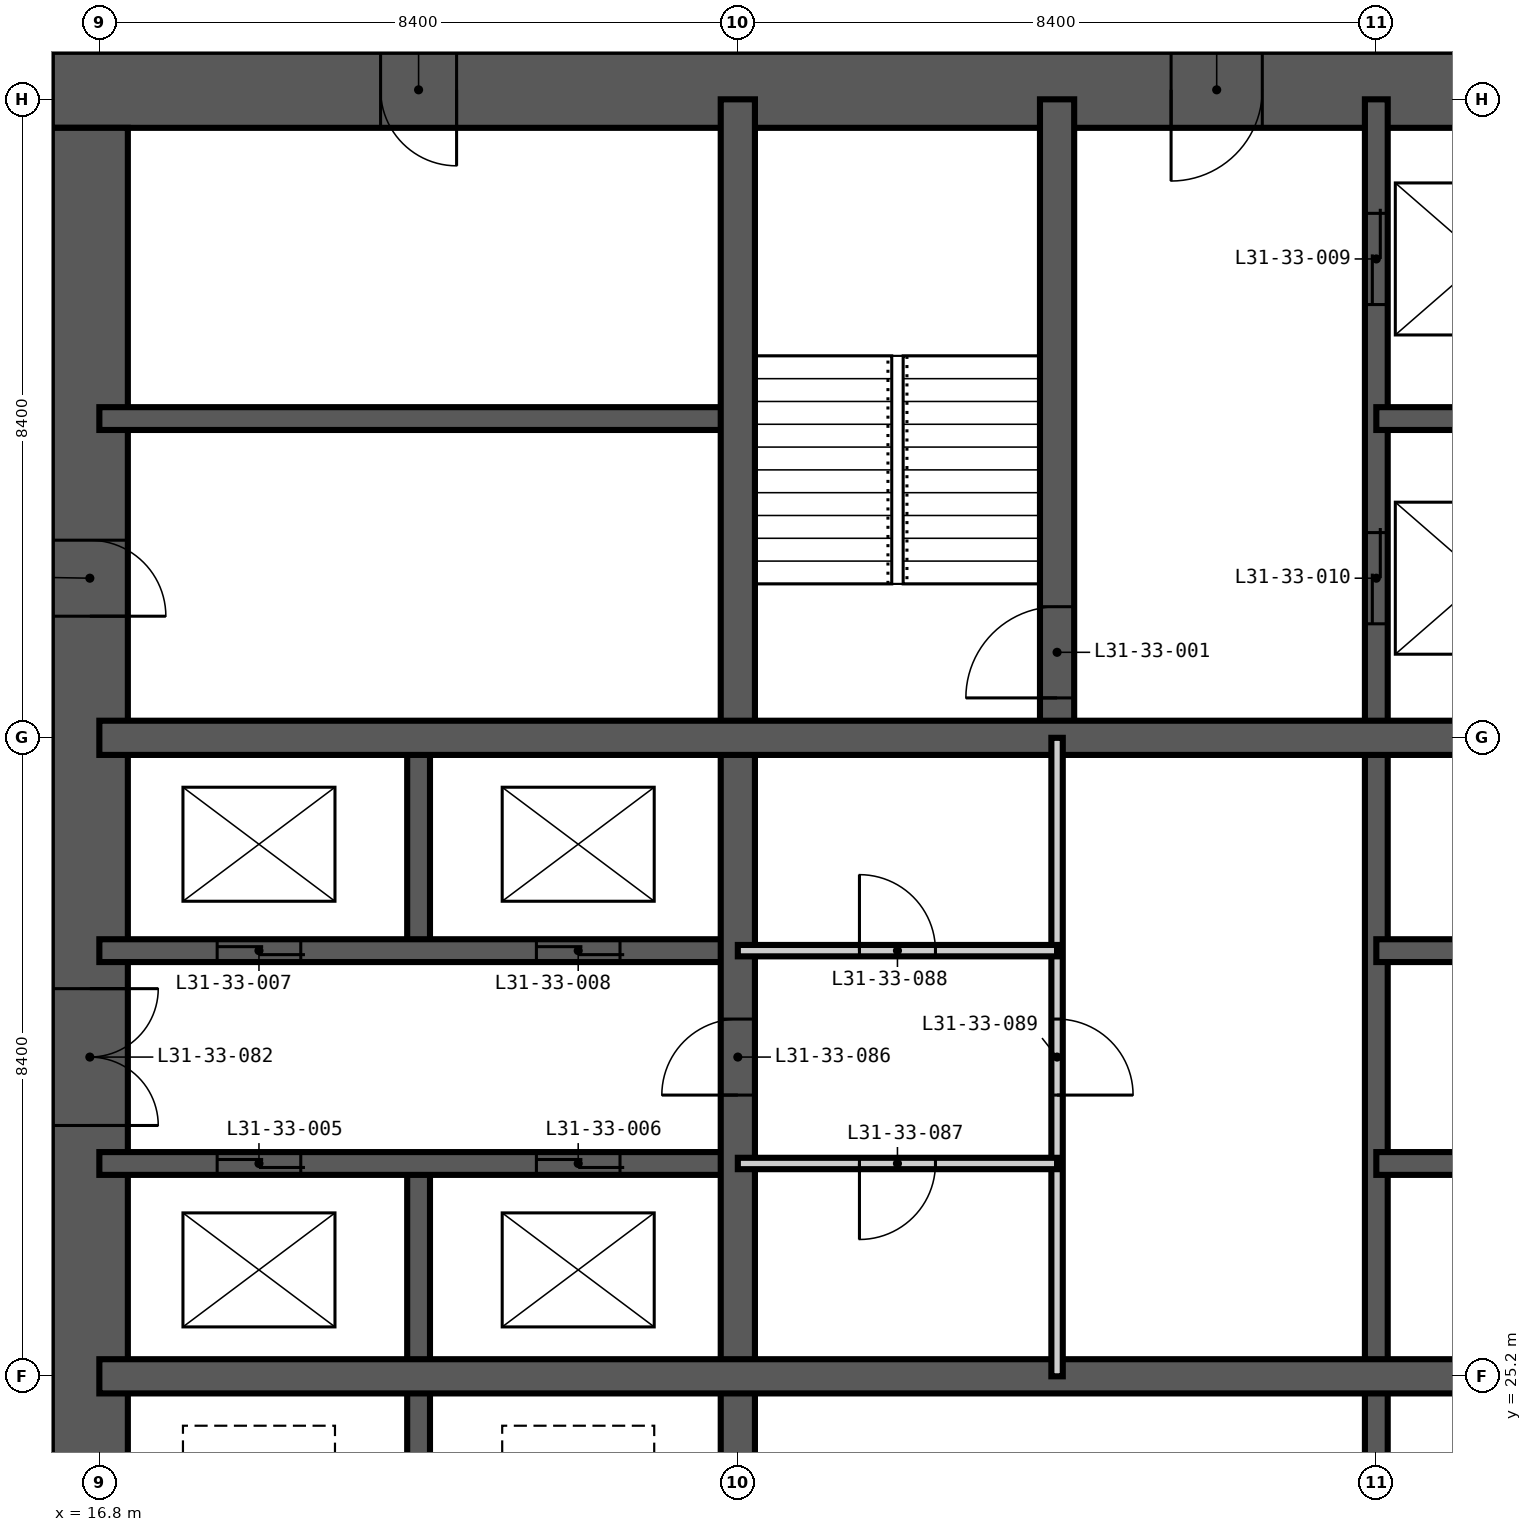
"""IFC4 building model, lengths in metres.
Left out: names, types, materials, properties, quantities, classifications, styles, units other than length and angle.
Written with IfcOpenShell. Run it as: python <this file> out.ifc"""

import sys

from ifc_helpers import new_model, si_unit, direction, frame, frame_2d, origin, place, context, subcontext, project, spatial, rectangle, extrude, element, fill, save


model = new_model("IFC4")
c1 = context("Model", 3, precision=1e-05, world=origin(), true_north=direction((0.0, 1.0)))
c2 = subcontext(c1, "Body", "Model", "MODEL_VIEW")
j1 = project(units=[si_unit("LENGTHUNIT", "METRE"), si_unit("PLANEANGLEUNIT", "RADIAN")], contexts=[c1])
p1 = place(None, origin())
s1 = spatial("IfcSite", under=j1, at=p1, CompositionType="ELEMENT")
p2 = place(p1, origin())
s2 = spatial("IfcBuilding", under=s1, at=p2, CompositionType="ELEMENT")
p3 = place(p2, frame((0.0, 0.0, 122.4)))
s3 = spatial("IfcBuildingStorey", under=s2, at=p3, CompositionType="ELEMENT", Elevation=122.4)
p4 = place(p3, frame((42.625, 42.125, -0.35), z_axis=(0.0, 0.0, 1.0), x_axis=(-1.0, 0.0, 0.0)))
e1 = element("IfcWall", 1, at=p4, inside=s3, PredefinedType="SHEAR", context=c2, shape_type="SweptSolid", body=[
    extrude(rectangle(XDim=26.45, YDim=1.0, at=frame_2d((13.225, 0.0))), origin(), (0.0, 0.0, 1.0), 3.6),
])
p5 = place(p4, frame((21.125, 0.0, 0.35)))
e2 = element("IfcOpeningElement", 2, at=p5, cuts=e1, PredefinedType="OPENING", context=c2, shape_type="SweptSolid", body=[
    extrude(rectangle(XDim=1.0, YDim=2.1, at=frame_2d((0.5, 1.05))), frame((0.0, 0.51, 0.0), z_axis=(0.0, -1.0, 0.0), x_axis=(1.0, 0.0, 0.0)), (0.0, 0.0, 1.0), 1.02),
])
p6 = place(p4, frame((10.525, 0.0, 0.35)))
e3 = element("IfcOpeningElement", 3, at=p6, cuts=e1, PredefinedType="OPENING", context=c2, shape_type="SweptSolid", body=[
    extrude(rectangle(XDim=1.2, YDim=2.2, at=frame_2d((0.6, 1.1))), frame((0.0, 0.51, 0.0), z_axis=(0.0, -1.0, 0.0), x_axis=(1.0, 0.0, 0.0)), (0.0, 0.0, 1.0), 1.02),
])
p7 = place(p3, frame((16.675, 41.625, -0.35), z_axis=(0.0, 0.0, 1.0), x_axis=(0.0, -1.0, 0.0)))
e4 = element("IfcWall", 4, at=p7, inside=s3, PredefinedType="SHEAR", context=c2, shape_type="SweptSolid", body=[
    extrude(rectangle(XDim=24.45, YDim=1.0, at=frame_2d((12.225, 0.0))), origin(), (0.0, 0.0, 1.0), 3.6),
])
p8 = place(p7, frame((11.325, 0.0, 0.35)))
e5 = element("IfcOpeningElement", 5, at=p8, cuts=e4, PredefinedType="OPENING", context=c2, shape_type="SweptSolid", body=[
    extrude(rectangle(XDim=1.8, YDim=2.2, at=frame_2d((0.9, 1.1))), frame((0.0, 0.51, 0.0), z_axis=(0.0, -1.0, 0.0), x_axis=(1.0, 0.0, 0.0)), (0.0, 0.0, 1.0), 1.02),
])
p9 = place(p7, frame((20.125, 0.0, 0.35)))
e6 = element("IfcOpeningElement", 6, at=p9, cuts=e4, PredefinedType="OPENING", context=c2, shape_type="SweptSolid", body=[
    extrude(rectangle(XDim=1.0, YDim=2.1, at=frame_2d((0.5, 1.05))), frame((0.0, 0.51, 0.0), z_axis=(0.0, -1.0, 0.0), x_axis=(1.0, 0.0, 0.0)), (0.0, 0.0, 1.0), 1.02),
])
p10 = place(p7, frame((5.425, 0.0, 0.35)))
e7 = element("IfcOpeningElement", 7, at=p10, cuts=e4, PredefinedType="OPENING", context=c2, shape_type="SweptSolid", body=[
    extrude(rectangle(XDim=1.0, YDim=2.1, at=frame_2d((0.5, 1.05))), frame((0.0, 0.51, 0.0), z_axis=(0.0, -1.0, 0.0), x_axis=(1.0, 0.0, 0.0)), (0.0, 0.0, 1.0), 1.02),
])
p11 = place(p3, frame((21.0, 22.4, -0.35), z_axis=(0.0, 0.0, 1.0), x_axis=(0.0, 1.0, 0.0)))
e8 = element("IfcWall", 8, at=p11, inside=s3, PredefinedType="SHEAR", context=c2, shape_type="SweptSolid", body=[
    extrude(rectangle(XDim=5.6, YDim=0.3, at=frame_2d((2.8, 0.0))), origin(), (0.0, 0.0, 1.0), 3.6),
])
p12 = place(p3, frame((21.0, 30.8, -0.35), z_axis=(0.0, 0.0, 1.0), x_axis=(0.0, 1.0, 0.0)))
e9 = element("IfcWall", 9, at=p12, inside=s3, PredefinedType="SHEAR", context=c2, shape_type="SweptSolid", body=[
    extrude(rectangle(XDim=2.8, YDim=0.3, at=frame_2d((1.4, 0.0))), origin(), (0.0, 0.0, 1.0), 3.6),
])
p13 = place(p3, frame((33.6, 16.8, -0.35), z_axis=(0.0, 0.0, 1.0), x_axis=(0.0, 1.0, 0.0)))
e10 = element("IfcWall", 10, at=p13, inside=s3, PredefinedType="SHEAR", context=c2, shape_type="SweptSolid", body=[
    extrude(rectangle(XDim=25.2, YDim=0.3, at=frame_2d((12.6, 0.0))), origin(), (0.0, 0.0, 1.0), 3.6),
])
p14 = place(p13, frame((22.5, 0.0, 0.35)))
e11 = element("IfcOpeningElement", 11, at=p14, cuts=e10, PredefinedType="OPENING", context=c2, shape_type="SweptSolid", body=[
    extrude(rectangle(XDim=1.2, YDim=2.2, at=frame_2d((0.6, 1.1))), frame((0.0, 0.16, 0.0), z_axis=(0.0, -1.0, 0.0), x_axis=(1.0, 0.0, 0.0)), (0.0, 0.0, 1.0), 0.32),
])
p15 = place(p13, frame((18.3, 0.0, 0.35)))
e12 = element("IfcOpeningElement", 12, at=p15, cuts=e10, PredefinedType="OPENING", context=c2, shape_type="SweptSolid", body=[
    extrude(rectangle(XDim=1.2, YDim=2.2, at=frame_2d((0.6, 1.1))), frame((0.0, 0.16, 0.0), z_axis=(0.0, -1.0, 0.0), x_axis=(1.0, 0.0, 0.0)), (0.0, 0.0, 1.0), 0.32),
])
p16 = place(p3, frame((16.8, 28.0, -0.35), z_axis=(0.0, 0.0, 1.0), x_axis=(1.0, 0.0, 0.0)))
e13 = element("IfcWall", 13, at=p16, inside=s3, PredefinedType="SHEAR", context=c2, shape_type="SweptSolid", body=[
    extrude(rectangle(XDim=8.4, YDim=0.3, at=frame_2d((4.2, 0.0))), origin(), (0.0, 0.0, 1.0), 3.6),
])
p17 = place(p16, frame((1.55, 0.0, 0.35)))
e14 = element("IfcOpeningElement", 14, at=p17, cuts=e13, PredefinedType="OPENING", context=c2, shape_type="SweptSolid", body=[
    extrude(rectangle(XDim=1.1, YDim=2.2, at=frame_2d((0.55, 1.1))), frame((0.0, 0.16, 0.0), z_axis=(0.0, -1.0, 0.0), x_axis=(1.0, 0.0, 0.0)), (0.0, 0.0, 1.0), 0.32),
])
p18 = place(p16, frame((5.75, 0.0, 0.35)))
e15 = element("IfcOpeningElement", 15, at=p18, cuts=e13, PredefinedType="OPENING", context=c2, shape_type="SweptSolid", body=[
    extrude(rectangle(XDim=1.1, YDim=2.2, at=frame_2d((0.55, 1.1))), frame((0.0, 0.16, 0.0), z_axis=(0.0, -1.0, 0.0), x_axis=(1.0, 0.0, 0.0)), (0.0, 0.0, 1.0), 0.32),
])
p19 = place(p3, frame((33.6, 28.0, -0.35), z_axis=(0.0, 0.0, 1.0), x_axis=(1.0, 0.0, 0.0)))
e16 = element("IfcWall", 16, at=p19, inside=s3, PredefinedType="SHEAR", context=c2, shape_type="SweptSolid", body=[
    extrude(rectangle(XDim=8.4, YDim=0.3, at=frame_2d((4.2, 0.0))), origin(), (0.0, 0.0, 1.0), 3.6),
])
p20 = place(p19, frame((1.55, 0.0, 0.35)))
e17 = element("IfcOpeningElement", 17, at=p20, cuts=e16, PredefinedType="OPENING", context=c2, shape_type="SweptSolid", body=[
    extrude(rectangle(XDim=1.1, YDim=2.2, at=frame_2d((0.55, 1.1))), frame((0.0, 0.16, 0.0), z_axis=(0.0, -1.0, 0.0), x_axis=(1.0, 0.0, 0.0)), (0.0, 0.0, 1.0), 0.32),
])
p21 = place(p19, frame((5.75, 0.0, 0.35)))
e18 = element("IfcOpeningElement", 18, at=p21, cuts=e16, PredefinedType="OPENING", context=c2, shape_type="SweptSolid", body=[
    extrude(rectangle(XDim=1.1, YDim=2.2, at=frame_2d((0.55, 1.1))), frame((0.0, 0.16, 0.0), z_axis=(0.0, -1.0, 0.0), x_axis=(1.0, 0.0, 0.0)), (0.0, 0.0, 1.0), 0.32),
])
p22 = place(p3, frame((16.8, 30.8, -0.35), z_axis=(0.0, 0.0, 1.0), x_axis=(1.0, 0.0, 0.0)))
e19 = element("IfcWall", 19, at=p22, inside=s3, PredefinedType="SHEAR", context=c2, shape_type="SweptSolid", body=[
    extrude(rectangle(XDim=8.4, YDim=0.3, at=frame_2d((4.2, 0.0))), origin(), (0.0, 0.0, 1.0), 3.6),
])
p23 = place(p22, frame((1.55, 0.0, 0.35)))
e20 = element("IfcOpeningElement", 20, at=p23, cuts=e19, PredefinedType="OPENING", context=c2, shape_type="SweptSolid", body=[
    extrude(rectangle(XDim=1.1, YDim=2.2, at=frame_2d((0.55, 1.1))), frame((0.0, 0.16, 0.0), z_axis=(0.0, -1.0, 0.0), x_axis=(1.0, 0.0, 0.0)), (0.0, 0.0, 1.0), 0.32),
])
p24 = place(p22, frame((5.75, 0.0, 0.35)))
e21 = element("IfcOpeningElement", 21, at=p24, cuts=e19, PredefinedType="OPENING", context=c2, shape_type="SweptSolid", body=[
    extrude(rectangle(XDim=1.1, YDim=2.2, at=frame_2d((0.55, 1.1))), frame((0.0, 0.16, 0.0), z_axis=(0.0, -1.0, 0.0), x_axis=(1.0, 0.0, 0.0)), (0.0, 0.0, 1.0), 0.32),
])
for number, where, z_axis, x_axis in (
    (22, (33.6, 30.8, -0.35), (0.0, 0.0, 1.0), (1.0, 0.0, 0.0)),
    (23, (16.8, 37.8, -0.35), (0.0, 0.0, 1.0), (1.0, 0.0, 0.0)),
):
    element("IfcWall", number, at=place(p3, frame(where, z_axis=z_axis, x_axis=x_axis)), inside=s3, PredefinedType="SHEAR", context=c2, shape_type="SweptSolid", body=[
        extrude(rectangle(XDim=8.4, YDim=0.3, at=frame_2d((4.2, 0.0))), origin(), (0.0, 0.0, 1.0), 3.6),
    ])
p25 = place(p3, frame((33.6, 37.8, -0.35), z_axis=(0.0, 0.0, 1.0), x_axis=(1.0, 0.0, 0.0)))
e24 = element("IfcWall", 24, at=p25, inside=s3, PredefinedType="SHEAR", context=c2, shape_type="SweptSolid", body=[
    extrude(rectangle(XDim=2.8, YDim=0.3, at=frame_2d((1.4, 0.0))), origin(), (0.0, 0.0, 1.0), 3.6),
])
p26 = place(p3, frame((25.2, 16.8, -0.35), z_axis=(0.0, 0.0, 1.0), x_axis=(0.0, 1.0, 0.0)))
e25 = element("IfcWall", 25, at=p26, inside=s3, PredefinedType="SHEAR", context=c2, shape_type="SweptSolid", body=[
    extrude(rectangle(XDim=25.2, YDim=0.45, at=frame_2d((12.6, 0.0))), origin(), (0.0, 0.0, 1.0), 3.6),
])
p27 = place(p26, frame((12.1, 0.0, 0.35)))
e26 = element("IfcOpeningElement", 26, at=p27, cuts=e25, PredefinedType="OPENING", context=c2, shape_type="SweptSolid", body=[
    extrude(rectangle(XDim=1.0, YDim=2.1, at=frame_2d((0.5, 1.05))), frame((0.0, 0.235, 0.0), z_axis=(0.0, -1.0, 0.0), x_axis=(1.0, 0.0, 0.0)), (0.0, 0.0, 1.0), 0.47),
])
p28 = place(p3, frame((29.4, 33.6, -0.35), z_axis=(0.0, 0.0, 1.0), x_axis=(0.0, 1.0, 0.0)))
e27 = element("IfcWall", 27, at=p28, inside=s3, PredefinedType="SHEAR", context=c2, shape_type="SweptSolid", body=[
    extrude(rectangle(XDim=8.4, YDim=0.45, at=frame_2d((4.2, 0.0))), origin(), (0.0, 0.0, 1.0), 3.6),
])
p29 = place(p28, frame((0.525, 0.0, 0.35)))
e28 = element("IfcOpeningElement", 28, at=p29, cuts=e27, PredefinedType="OPENING", context=c2, shape_type="SweptSolid", body=[
    extrude(rectangle(XDim=1.2, YDim=2.2, at=frame_2d((0.6, 1.1))), frame((0.0, 0.235, 0.0), z_axis=(0.0, -1.0, 0.0), x_axis=(1.0, 0.0, 0.0)), (0.0, 0.0, 1.0), 0.47),
])
p30 = place(p3, frame((16.8, 25.2, -0.35), z_axis=(0.0, 0.0, 1.0), x_axis=(1.0, 0.0, 0.0)))
e29 = element("IfcWall", 29, at=p30, inside=s3, PredefinedType="SHEAR", context=c2, shape_type="SweptSolid", body=[
    extrude(rectangle(XDim=25.2, YDim=0.45, at=frame_2d((12.6, 0.0))), origin(), (0.0, 0.0, 1.0), 3.6),
])
p31 = place(p3, frame((16.8, 33.6, -0.35), z_axis=(0.0, 0.0, 1.0), x_axis=(1.0, 0.0, 0.0)))
e30 = element("IfcWall", 30, at=p31, inside=s3, PredefinedType="SHEAR", context=c2, shape_type="SweptSolid", body=[
    extrude(rectangle(XDim=25.2, YDim=0.45, at=frame_2d((12.6, 0.0))), origin(), (0.0, 0.0, 1.0), 3.6),
])
p32 = place(p31, frame((23.3, 0.0, 0.35)))
e31 = element("IfcOpeningElement", 31, at=p32, cuts=e30, PredefinedType="OPENING", context=c2, shape_type="SweptSolid", body=[
    extrude(rectangle(XDim=1.0, YDim=2.1, at=frame_2d((0.5, 1.05))), frame((0.0, 0.235, 0.0), z_axis=(0.0, -1.0, 0.0), x_axis=(1.0, 0.0, 0.0)), (0.0, 0.0, 1.0), 0.47),
])
p33 = place(p3, frame((29.4, 25.2, 0.0), z_axis=(0.0, 0.0, 1.0), x_axis=(0.0, 1.0, 0.0)))
e32 = element("IfcWall", 32, at=p33, inside=s3, PredefinedType="PARTITIONING", context=c2, shape_type="SweptSolid", body=[
    extrude(rectangle(XDim=8.4, YDim=0.15, at=frame_2d((4.2, 0.0))), origin(), (0.0, 0.0, 1.0), 3.25),
])
p34 = place(p33, frame((3.7, 0.0, 0.0)))
e33 = element("IfcOpeningElement", 33, at=p34, cuts=e32, PredefinedType="OPENING", context=c2, shape_type="SweptSolid", body=[
    extrude(rectangle(XDim=1.0, YDim=2.1, at=frame_2d((0.5, 1.05))), frame((0.0, 0.085, 0.0), z_axis=(0.0, -1.0, 0.0), x_axis=(1.0, 0.0, 0.0)), (0.0, 0.0, 1.0), 0.17),
])
p35 = place(p3, frame((25.2, 28.0, 0.0), z_axis=(0.0, 0.0, 1.0), x_axis=(1.0, 0.0, 0.0)))
e34 = element("IfcWall", 34, at=p35, inside=s3, PredefinedType="PARTITIONING", context=c2, shape_type="SweptSolid", body=[
    extrude(rectangle(XDim=4.2, YDim=0.15, at=frame_2d((2.1, 0.0))), origin(), (0.0, 0.0, 1.0), 3.25),
])
p36 = place(p35, frame((1.6, 0.0, 0.0)))
e35 = element("IfcOpeningElement", 35, at=p36, cuts=e34, PredefinedType="OPENING", context=c2, shape_type="SweptSolid", body=[
    extrude(rectangle(XDim=1.0, YDim=2.1, at=frame_2d((0.5, 1.05))), frame((0.0, 0.085, 0.0), z_axis=(0.0, -1.0, 0.0), x_axis=(1.0, 0.0, 0.0)), (0.0, 0.0, 1.0), 0.17),
])
p37 = place(p3, frame((25.2, 30.8, 0.0), z_axis=(0.0, 0.0, 1.0), x_axis=(1.0, 0.0, 0.0)))
e36 = element("IfcWall", 36, at=p37, inside=s3, PredefinedType="PARTITIONING", context=c2, shape_type="SweptSolid", body=[
    extrude(rectangle(XDim=4.2, YDim=0.15, at=frame_2d((2.1, 0.0))), origin(), (0.0, 0.0, 1.0), 3.25),
])
p38 = place(p37, frame((1.6, 0.0, 0.0)))
e37 = element("IfcOpeningElement", 37, at=p38, cuts=e36, PredefinedType="OPENING", context=c2, shape_type="SweptSolid", body=[
    extrude(rectangle(XDim=1.0, YDim=2.1, at=frame_2d((0.5, 1.05))), frame((0.0, 0.085, 0.0), z_axis=(0.0, -1.0, 0.0), x_axis=(1.0, 0.0, 0.0)), (0.0, 0.0, 1.0), 0.17),
])
p39 = place(p29, origin())
e38 = element("IfcDoor", 38, at=p39, inside=s3, OperationType="SINGLE_SWING_LEFT", PredefinedType="DOOR", context=c2, shape_type="SweptSolid", body=[
    extrude(rectangle(XDim=1.2, YDim=2.2, at=frame_2d((0.6, 1.1))), frame((0.0, 0.025, 0.0), z_axis=(0.0, -1.0, 0.0), x_axis=(1.0, 0.0, 0.0)), (0.0, 0.0, 1.0), 0.05),
])
fill(e28, e38)
p40 = place(p17, origin())
e39 = element("IfcDoor", 39, at=p40, inside=s3, OperationType="DOUBLE_DOOR_SLIDING", PredefinedType="DOOR", context=c2, shape_type="SweptSolid", body=[
    extrude(rectangle(XDim=1.1, YDim=2.2, at=frame_2d((0.55, 1.1))), frame((0.0, 0.025, 0.0), z_axis=(0.0, -1.0, 0.0), x_axis=(1.0, 0.0, 0.0)), (0.0, 0.0, 1.0), 0.05),
])
fill(e14, e39)
p41 = place(p18, origin())
e40 = element("IfcDoor", 40, at=p41, inside=s3, OperationType="DOUBLE_DOOR_SLIDING", PredefinedType="DOOR", context=c2, shape_type="SweptSolid", body=[
    extrude(rectangle(XDim=1.1, YDim=2.2, at=frame_2d((0.55, 1.1))), frame((0.0, 0.025, 0.0), z_axis=(0.0, -1.0, 0.0), x_axis=(1.0, 0.0, 0.0)), (0.0, 0.0, 1.0), 0.05),
])
fill(e15, e40)
p42 = place(p23, origin())
e41 = element("IfcDoor", 41, at=p42, inside=s3, OperationType="DOUBLE_DOOR_SLIDING", PredefinedType="DOOR", context=c2, shape_type="SweptSolid", body=[
    extrude(rectangle(XDim=1.1, YDim=2.2, at=frame_2d((0.55, 1.1))), frame((0.0, 0.025, 0.0), z_axis=(0.0, -1.0, 0.0), x_axis=(1.0, 0.0, 0.0)), (0.0, 0.0, 1.0), 0.05),
])
fill(e20, e41)
p43 = place(p24, origin())
e42 = element("IfcDoor", 42, at=p43, inside=s3, OperationType="DOUBLE_DOOR_SLIDING", PredefinedType="DOOR", context=c2, shape_type="SweptSolid", body=[
    extrude(rectangle(XDim=1.1, YDim=2.2, at=frame_2d((0.55, 1.1))), frame((0.0, 0.025, 0.0), z_axis=(0.0, -1.0, 0.0), x_axis=(1.0, 0.0, 0.0)), (0.0, 0.0, 1.0), 0.05),
])
fill(e21, e42)
p44 = place(p14, origin())
e43 = element("IfcDoor", 43, at=p44, inside=s3, OperationType="DOUBLE_DOOR_SLIDING", PredefinedType="DOOR", context=c2, shape_type="SweptSolid", body=[
    extrude(rectangle(XDim=1.2, YDim=2.2, at=frame_2d((0.6, 1.1))), frame((0.0, 0.025, 0.0), z_axis=(0.0, -1.0, 0.0), x_axis=(1.0, 0.0, 0.0)), (0.0, 0.0, 1.0), 0.05),
])
fill(e11, e43)
p45 = place(p15, origin())
e44 = element("IfcDoor", 44, at=p45, inside=s3, OperationType="DOUBLE_DOOR_SLIDING", PredefinedType="DOOR", context=c2, shape_type="SweptSolid", body=[
    extrude(rectangle(XDim=1.2, YDim=2.2, at=frame_2d((0.6, 1.1))), frame((0.0, 0.025, 0.0), z_axis=(0.0, -1.0, 0.0), x_axis=(1.0, 0.0, 0.0)), (0.0, 0.0, 1.0), 0.05),
])
fill(e12, e44)
p46 = place(p8, origin())
e45 = element("IfcDoor", 45, at=p46, inside=s3, OperationType="DOUBLE_DOOR_DOUBLE_SWING", PredefinedType="DOOR", context=c2, shape_type="SweptSolid", body=[
    extrude(rectangle(XDim=1.8, YDim=2.2, at=frame_2d((0.9, 1.1))), frame((0.0, 0.025, 0.0), z_axis=(0.0, -1.0, 0.0), x_axis=(1.0, 0.0, 0.0)), (0.0, 0.0, 1.0), 0.05),
])
fill(e5, e45)
p47 = place(p10, origin())
e46 = element("IfcDoor", 46, at=p47, inside=s3, OperationType="SINGLE_SWING_RIGHT", PredefinedType="DOOR", context=c2, shape_type="SweptSolid", body=[
    extrude(rectangle(XDim=1.0, YDim=2.1, at=frame_2d((0.5, 1.05))), frame((0.0, 0.025, 0.0), z_axis=(0.0, -1.0, 0.0), x_axis=(1.0, 0.0, 0.0)), (0.0, 0.0, 1.0), 0.05),
])
fill(e7, e46)
p48 = place(p5, origin())
e47 = element("IfcDoor", 47, at=p48, inside=s3, OperationType="SINGLE_SWING_LEFT", PredefinedType="DOOR", context=c2, shape_type="SweptSolid", body=[
    extrude(rectangle(XDim=1.0, YDim=2.1, at=frame_2d((0.5, 1.05))), frame((0.0, 0.025, 0.0), z_axis=(0.0, -1.0, 0.0), x_axis=(1.0, 0.0, 0.0)), (0.0, 0.0, 1.0), 0.05),
])
fill(e2, e47)
p49 = place(p27, origin())
e48 = element("IfcDoor", 48, at=p49, inside=s3, OperationType="SINGLE_SWING_LEFT", PredefinedType="DOOR", context=c2, shape_type="SweptSolid", body=[
    extrude(rectangle(XDim=1.0, YDim=2.1, at=frame_2d((0.5, 1.05))), frame((0.0, 0.025, 0.0), z_axis=(0.0, -1.0, 0.0), x_axis=(1.0, 0.0, 0.0)), (0.0, 0.0, 1.0), 0.05),
])
fill(e26, e48)
p50 = place(p36, frame((1.0, 0.0, 0.0), z_axis=(0.0, 0.0, 1.0), x_axis=(-1.0, 0.0, 0.0)))
e49 = element("IfcDoor", 49, at=p50, inside=s3, OperationType="SINGLE_SWING_RIGHT", PredefinedType="DOOR", context=c2, shape_type="SweptSolid", body=[
    extrude(rectangle(XDim=1.0, YDim=2.1, at=frame_2d((0.5, 1.05))), frame((0.0, 0.025, 0.0), z_axis=(0.0, -1.0, 0.0), x_axis=(1.0, 0.0, 0.0)), (0.0, 0.0, 1.0), 0.05),
])
fill(e35, e49)
p51 = place(p38, origin())
e50 = element("IfcDoor", 50, at=p51, inside=s3, OperationType="SINGLE_SWING_LEFT", PredefinedType="DOOR", context=c2, shape_type="SweptSolid", body=[
    extrude(rectangle(XDim=1.0, YDim=2.1, at=frame_2d((0.5, 1.05))), frame((0.0, 0.025, 0.0), z_axis=(0.0, -1.0, 0.0), x_axis=(1.0, 0.0, 0.0)), (0.0, 0.0, 1.0), 0.05),
])
fill(e37, e50)
p52 = place(p34, frame((1.0, 0.0, 0.0), z_axis=(0.0, 0.0, 1.0), x_axis=(-1.0, 0.0, 0.0)))
e51 = element("IfcDoor", 51, at=p52, inside=s3, OperationType="SINGLE_SWING_RIGHT", PredefinedType="DOOR", context=c2, shape_type="SweptSolid", body=[
    extrude(rectangle(XDim=1.0, YDim=2.1, at=frame_2d((0.5, 1.05))), frame((0.0, 0.025, 0.0), z_axis=(0.0, -1.0, 0.0), x_axis=(1.0, 0.0, 0.0)), (0.0, 0.0, 1.0), 0.05),
])
fill(e33, e51)
p53 = place(p6, origin())
e52 = element("IfcDoor", 52, at=p53, inside=s3, OperationType="SINGLE_SWING_RIGHT", PredefinedType="DOOR", context=c2, shape_type="SweptSolid", body=[
    extrude(rectangle(XDim=1.2, YDim=2.2, at=frame_2d((0.6, 1.1))), frame((0.0, 0.025, 0.0), z_axis=(0.0, -1.0, 0.0), x_axis=(1.0, 0.0, 0.0)), (0.0, 0.0, 1.0), 0.05),
])
fill(e3, e52)
save(model, sys.argv[1])
